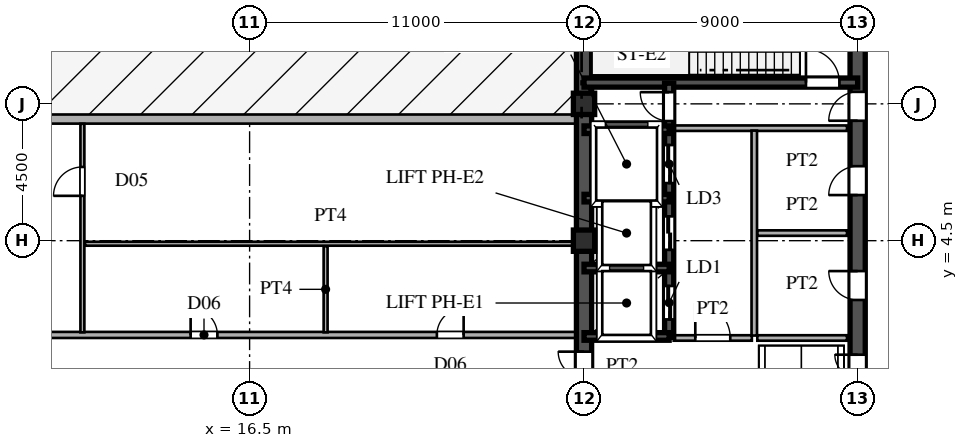
"""IFC4 building model, lengths in metres.
Left out: names, types, materials, properties, quantities, classifications, styles, units other than length and angle.
Written with IfcOpenShell. Run it as: python <this file> out.ifc"""

import sys

from ifc_helpers import new_model, si_unit, direction, frame, frame_2d, origin, origin_2d, place, context, subcontext, project, spatial, rectangle, hollow_rectangle, extrude, source, transform, mapped, element, fill, save


model = new_model("IFC4")
c1 = context("Model", 3, precision=1e-05, world=origin(), true_north=direction((0.0, 1.0)))
c2 = subcontext(c1, "Body", "Model", "MODEL_VIEW")
j1 = project(units=[si_unit("LENGTHUNIT", "METRE"), si_unit("PLANEANGLEUNIT", "RADIAN")], contexts=[c1])
p1 = place(None, origin())
s1 = spatial("IfcSite", under=j1, at=p1, CompositionType="ELEMENT")
p2 = place(p1, origin())
s2 = spatial("IfcBuilding", under=s1, at=p2, CompositionType="ELEMENT")
p3 = place(p2, frame((0.0, 0.0, 274.2)))
s3 = spatial("IfcBuildingStorey", under=s2, at=p3, CompositionType="ELEMENT", Elevation=274.2)
m1 = source(origin(), c2, "Body", "SweptSolid", [
    extrude(hollow_rectangle(XDim=0.7, YDim=0.7, WallThickness=0.03, at=origin_2d()), origin(), (0.0, 0.0, 1.0), 4.8),
])
for number, where, z_axis, x_axis in (
    (1, (27.5, 4.5, 0.0), (0.0, 0.0, 1.0), (1.0, 0.0, 0.0)),
    (2, (27.5, 9.0, 0.0), (0.0, 0.0, 1.0), (1.0, 0.0, 0.0)),
):
    element("IfcColumn", number, at=place(p3, frame(where, z_axis=z_axis, x_axis=x_axis)), inside=s3, PredefinedType="COLUMN", context=c2, shape_type="MappedRepresentation", body=[
        mapped(m1, transform((0.0, 0.0, 0.0), scale=1.0)),
    ])
p4 = place(p3, frame((-27.45, 8.5, 0.0), z_axis=(0.0, 0.0, 1.0), x_axis=(1.0, 0.0, 0.0)))
e3 = element("IfcWall", 3, at=p4, inside=s3, PredefinedType="SOLIDWALL", context=c2, shape_type="SweptSolid", body=[
    extrude(rectangle(XDim=54.9, YDim=0.3, at=frame_2d((27.45, 0.0))), origin(), (0.0, 0.0, 1.0), 4.52),
])
p5 = place(p4, frame((12.95, 0.0, 0.0)))
e4 = element("IfcOpeningElement", 4, at=p5, cuts=e3, PredefinedType="OPENING", context=c2, shape_type="SweptSolid", body=[
    extrude(rectangle(XDim=1.9, YDim=2.4, at=frame_2d((0.95, 1.2))), frame((0.0, 0.16, 0.0), z_axis=(0.0, -1.0, 0.0), x_axis=(1.0, 0.0, 0.0)), (0.0, 0.0, 1.0), 0.32),
])
p6 = place(p4, frame((23.95, 0.0, 0.0)))
e5 = element("IfcOpeningElement", 5, at=p6, cuts=e3, PredefinedType="OPENING", context=c2, shape_type="SweptSolid", body=[
    extrude(rectangle(XDim=1.9, YDim=2.4, at=frame_2d((0.95, 1.2))), frame((0.0, 0.16, 0.0), z_axis=(0.0, -1.0, 0.0), x_axis=(1.0, 0.0, 0.0)), (0.0, 0.0, 1.0), 0.32),
])
p7 = place(p4, frame((6.95, 0.0, 0.8)))
e6 = element("IfcOpeningElement", 6, at=p7, cuts=e3, PredefinedType="OPENING", context=c2, shape_type="SweptSolid", body=[
    extrude(rectangle(XDim=2.8, YDim=2.1, at=frame_2d((1.4, 1.05))), frame((0.0, 0.16, 0.0), z_axis=(0.0, -1.0, 0.0), x_axis=(1.0, 0.0, 0.0)), (0.0, 0.0, 1.0), 0.32),
])
p8 = place(p4, frame((17.95, 0.0, 0.8)))
e7 = element("IfcOpeningElement", 7, at=p8, cuts=e3, PredefinedType="OPENING", context=c2, shape_type="SweptSolid", body=[
    extrude(rectangle(XDim=2.8, YDim=2.1, at=frame_2d((1.4, 1.05))), frame((0.0, 0.16, 0.0), z_axis=(0.0, -1.0, 0.0), x_axis=(1.0, 0.0, 0.0)), (0.0, 0.0, 1.0), 0.32),
])
p9 = place(p4, frame((28.95, 0.0, 0.8)))
e8 = element("IfcOpeningElement", 8, at=p9, cuts=e3, PredefinedType="OPENING", context=c2, shape_type="SweptSolid", body=[
    extrude(rectangle(XDim=2.8, YDim=2.1, at=frame_2d((1.4, 1.05))), frame((0.0, 0.16, 0.0), z_axis=(0.0, -1.0, 0.0), x_axis=(1.0, 0.0, 0.0)), (0.0, 0.0, 1.0), 0.32),
])
p10 = place(p3, frame((27.5, 1.3, 0.0), z_axis=(0.0, 0.0, 1.0), x_axis=(0.0, 1.0, 0.0)))
e9 = element("IfcWall", 9, at=p10, inside=s3, PredefinedType="SHEAR", context=c2, shape_type="SweptSolid", body=[
    extrude(rectangle(XDim=12.2, YDim=0.5, at=frame_2d((6.1, 0.0))), origin(), (0.0, 0.0, 1.0), 4.52),
])
p11 = place(p3, frame((27.5, -1.3, 0.0), z_axis=(0.0, 0.0, 1.0), x_axis=(0.0, 1.0, 0.0)))
e10 = element("IfcWall", 10, at=p11, inside=s3, PredefinedType="SHEAR", context=c2, shape_type="SweptSolid", body=[
    extrude(rectangle(XDim=2.6, YDim=0.5, at=frame_2d((1.3, 0.0))), origin(), (0.0, 0.0, 1.0), 4.52),
])
p12 = place(p11, frame((0.45, 0.0, 0.0)))
e11 = element("IfcOpeningElement", 11, at=p12, cuts=e10, PredefinedType="OPENING", context=c2, shape_type="SweptSolid", body=[
    extrude(rectangle(XDim=1.7, YDim=2.35, at=frame_2d((0.85, 1.175))), frame((0.0, 0.26, 0.0), z_axis=(0.0, -1.0, 0.0), x_axis=(1.0, 0.0, 0.0)), (0.0, 0.0, 1.0), 0.52),
])
p13 = place(p3, frame((36.5, -1.3, 0.0), z_axis=(0.0, 0.0, 1.0), x_axis=(0.0, 1.0, 0.0)))
e12 = element("IfcWall", 12, at=p13, inside=s3, PredefinedType="SHEAR", context=c2, shape_type="SweptSolid", body=[
    extrude(rectangle(XDim=2.6, YDim=0.5, at=frame_2d((1.3, 0.0))), origin(), (0.0, 0.0, 1.0), 4.52),
])
p14 = place(p13, frame((0.55, 0.0, 0.0)))
e13 = element("IfcOpeningElement", 13, at=p14, cuts=e12, PredefinedType="OPENING", context=c2, shape_type="SweptSolid", body=[
    extrude(rectangle(XDim=1.5, YDim=2.3, at=frame_2d((0.75, 1.15))), frame((0.0, 0.26, 0.0), z_axis=(0.0, -1.0, 0.0), x_axis=(1.0, 0.0, 0.0)), (0.0, 0.0, 1.0), 0.52),
])
p15 = place(p3, frame((36.5, 8.2, 0.0), z_axis=(0.0, 0.0, 1.0), x_axis=(0.0, 1.0, 0.0)))
e14 = element("IfcWall", 14, at=p15, inside=s3, PredefinedType="SHEAR", context=c2, shape_type="SweptSolid", body=[
    extrude(rectangle(XDim=5.45, YDim=0.5, at=frame_2d((2.725, 0.0))), origin(), (0.0, 0.0, 1.0), 4.52),
])
p16 = place(p15, frame((0.245, 0.0, 0.0)))
e15 = element("IfcOpeningElement", 15, at=p16, cuts=e14, PredefinedType="OPENING", context=c2, shape_type="SweptSolid", body=[
    extrude(rectangle(XDim=0.95, YDim=2.15, at=frame_2d((0.475, 1.075))), frame((0.0, 0.26, 0.0), z_axis=(0.0, -1.0, 0.0), x_axis=(1.0, 0.0, 0.0)), (0.0, 0.0, 1.0), 0.52),
])
p17 = place(p3, frame((36.5, 1.3, 0.0), z_axis=(0.0, 0.0, 1.0), x_axis=(0.0, 1.0, 0.0)))
e16 = element("IfcWall", 16, at=p17, inside=s3, PredefinedType="SHEAR", context=c2, shape_type="SweptSolid", body=[
    extrude(rectangle(XDim=3.45, YDim=0.5, at=frame_2d((1.725, 0.0))), origin(), (0.0, 0.0, 1.0), 4.52),
])
p18 = place(p17, frame((1.25, 0.0, 0.0)))
e17 = element("IfcOpeningElement", 17, at=p18, cuts=e16, PredefinedType="OPENING", context=c2, shape_type="SweptSolid", body=[
    extrude(rectangle(XDim=0.95, YDim=2.15, at=frame_2d((0.475, 1.075))), frame((0.0, 0.26, 0.0), z_axis=(0.0, -1.0, 0.0), x_axis=(1.0, 0.0, 0.0)), (0.0, 0.0, 1.0), 0.52),
])
p19 = place(p3, frame((36.5, 4.75, 0.0), z_axis=(0.0, 0.0, 1.0), x_axis=(0.0, 1.0, 0.0)))
e18 = element("IfcWall", 18, at=p19, inside=s3, PredefinedType="SHEAR", context=c2, shape_type="SweptSolid", body=[
    extrude(rectangle(XDim=3.45, YDim=0.5, at=frame_2d((1.725, 0.0))), origin(), (0.0, 0.0, 1.0), 4.52),
])
p20 = place(p19, frame((1.25, 0.0, 0.0)))
e19 = element("IfcOpeningElement", 19, at=p20, cuts=e18, PredefinedType="OPENING", context=c2, shape_type="SweptSolid", body=[
    extrude(rectangle(XDim=0.95, YDim=2.15, at=frame_2d((0.475, 1.075))), frame((0.0, 0.26, 0.0), z_axis=(0.0, -1.0, 0.0), x_axis=(1.0, 0.0, 0.0)), (0.0, 0.0, 1.0), 0.52),
])
p21 = place(p3, frame((27.5, 9.7, 0.0), z_axis=(0.0, 0.0, 1.0), x_axis=(1.0, 0.0, 0.0)))
e20 = element("IfcWall", 20, at=p21, inside=s3, PredefinedType="SHEAR", context=c2, shape_type="SweptSolid", body=[
    extrude(rectangle(XDim=9.0, YDim=0.3, at=frame_2d((4.5, 0.0))), origin(), (0.0, 0.0, 1.0), 4.52),
])
p22 = place(p21, frame((7.3, 0.0, 0.0)))
e21 = element("IfcOpeningElement", 21, at=p22, cuts=e20, PredefinedType="OPENING", context=c2, shape_type="SweptSolid", body=[
    extrude(rectangle(XDim=1.1, YDim=2.2, at=frame_2d((0.55, 1.1))), frame((0.0, 0.16, 0.0), z_axis=(0.0, -1.0, 0.0), x_axis=(1.0, 0.0, 0.0)), (0.0, 0.0, 1.0), 0.32),
])
for number, where, z_axis, x_axis in (
    (22, (27.5, 1.35, 0.0), (0.0, 0.0, 1.0), (1.0, 0.0, 0.0)),
    (23, (27.5, 3.6, 0.0), (0.0, 0.0, 1.0), (1.0, 0.0, 0.0)),
    (24, (27.5, 5.9, 0.0), (0.0, 0.0, 1.0), (1.0, 0.0, 0.0)),
    (25, (27.5, 8.15, 0.0), (0.0, 0.0, 1.0), (1.0, 0.0, 0.0)),
):
    element("IfcWall", number, at=place(p3, frame(where, z_axis=z_axis, x_axis=x_axis)), inside=s3, PredefinedType="SHEAR", context=c2, shape_type="SweptSolid", body=[
        extrude(rectangle(XDim=2.8, YDim=0.25, at=frame_2d((1.4, 0.0))), origin(), (0.0, 0.0, 1.0), 4.52),
    ])
p23 = place(p3, frame((30.3, 1.32, 0.0), z_axis=(0.0, 0.0, 1.0), x_axis=(0.0, 1.0, 0.0)))
e26 = element("IfcWall", 26, at=p23, inside=s3, PredefinedType="SHEAR", context=c2, shape_type="SweptSolid", body=[
    extrude(rectangle(XDim=2.28, YDim=0.3, at=frame_2d((1.14, 0.0))), origin(), (0.0, 0.0, 1.0), 4.52),
])
p24 = place(p23, frame((0.59, 0.0, 0.0)))
e27 = element("IfcOpeningElement", 27, at=p24, cuts=e26, PredefinedType="OPENING", context=c2, shape_type="SweptSolid", body=[
    extrude(rectangle(XDim=1.1, YDim=2.2, at=frame_2d((0.55, 1.1))), frame((0.0, 0.16, 0.0), z_axis=(0.0, -1.0, 0.0), x_axis=(1.0, 0.0, 0.0)), (0.0, 0.0, 1.0), 0.32),
])
p25 = place(p3, frame((30.3, 3.6, 0.0), z_axis=(0.0, 0.0, 1.0), x_axis=(0.0, 1.0, 0.0)))
e28 = element("IfcWall", 28, at=p25, inside=s3, PredefinedType="SHEAR", context=c2, shape_type="SweptSolid", body=[
    extrude(rectangle(XDim=2.3, YDim=0.3, at=frame_2d((1.15, 0.0))), origin(), (0.0, 0.0, 1.0), 4.52),
])
p26 = place(p25, frame((0.6, 0.0, 0.0)))
e29 = element("IfcOpeningElement", 29, at=p26, cuts=e28, PredefinedType="OPENING", context=c2, shape_type="SweptSolid", body=[
    extrude(rectangle(XDim=1.1, YDim=2.2, at=frame_2d((0.55, 1.1))), frame((0.0, 0.16, 0.0), z_axis=(0.0, -1.0, 0.0), x_axis=(1.0, 0.0, 0.0)), (0.0, 0.0, 1.0), 0.32),
])
p27 = place(p3, frame((30.3, 5.9, 0.0), z_axis=(0.0, 0.0, 1.0), x_axis=(0.0, 1.0, 0.0)))
e30 = element("IfcWall", 30, at=p27, inside=s3, PredefinedType="SHEAR", context=c2, shape_type="SweptSolid", body=[
    extrude(rectangle(XDim=2.25, YDim=0.3, at=frame_2d((1.125, 0.0))), origin(), (0.0, 0.0, 1.0), 4.52),
])
p28 = place(p27, frame((0.495, 0.0, 0.0)))
e31 = element("IfcOpeningElement", 31, at=p28, cuts=e30, PredefinedType="OPENING", context=c2, shape_type="SweptSolid", body=[
    extrude(rectangle(XDim=1.25, YDim=2.3, at=frame_2d((0.625, 1.15))), frame((0.0, 0.16, 0.0), z_axis=(0.0, -1.0, 0.0), x_axis=(1.0, 0.0, 0.0)), (0.0, 0.0, 1.0), 0.32),
])
p29 = place(p3, frame((30.3, 8.15, 0.0), z_axis=(0.0, 0.0, 1.0), x_axis=(0.0, 1.0, 0.0)))
e32 = element("IfcWall", 32, at=p29, inside=s3, PredefinedType="SHEAR", context=c2, shape_type="SweptSolid", body=[
    extrude(rectangle(XDim=1.53, YDim=0.3, at=frame_2d((0.765, 0.0))), origin(), (0.0, 0.0, 1.0), 4.52),
])
p30 = place(p29, frame((0.285, 0.0, 0.0)))
e33 = element("IfcOpeningElement", 33, at=p30, cuts=e32, PredefinedType="OPENING", context=c2, shape_type="SweptSolid", body=[
    extrude(rectangle(XDim=0.95, YDim=2.15, at=frame_2d((0.475, 1.075))), frame((0.0, 0.16, 0.0), z_axis=(0.0, -1.0, 0.0), x_axis=(1.0, 0.0, 0.0)), (0.0, 0.0, 1.0), 0.32),
])
p31 = place(p3, frame((30.45, 8.2, 0.0), z_axis=(0.0, 0.0, 1.0), x_axis=(1.0, 0.0, 0.0)))
e34 = element("IfcWall", 34, at=p31, inside=s3, PredefinedType="PARTITIONING", context=c2, shape_type="SweptSolid", body=[
    extrude(rectangle(XDim=5.7, YDim=0.18, at=frame_2d((2.85, 0.0))), origin(), (0.0, 0.0, 1.0), 4.52),
])
p32 = place(p3, frame((33.1, 1.38, 0.0), z_axis=(0.0, 0.0, 1.0), x_axis=(0.0, 1.0, 0.0)))
e35 = element("IfcWall", 35, at=p32, inside=s3, PredefinedType="PARTITIONING", context=c2, shape_type="SweptSolid", body=[
    extrude(rectangle(XDim=6.74, YDim=0.18, at=frame_2d((3.37, 0.0))), origin(), (0.0, 0.0, 1.0), 4.52),
])
p33 = place(p3, frame((30.45, 1.3, 0.0), z_axis=(0.0, 0.0, 1.0), x_axis=(1.0, 0.0, 0.0)))
e36 = element("IfcWall", 36, at=p33, inside=s3, PredefinedType="PARTITIONING", context=c2, shape_type="SweptSolid", body=[
    extrude(rectangle(XDim=2.57, YDim=0.18, at=frame_2d((1.285, 0.0))), origin(), (0.0, 0.0, 1.0), 4.52),
])
p34 = place(p33, frame((0.71, 0.0, 0.0)))
e37 = element("IfcOpeningElement", 37, at=p34, cuts=e36, PredefinedType="OPENING", context=c2, shape_type="SweptSolid", body=[
    extrude(rectangle(XDim=1.15, YDim=2.2, at=frame_2d((0.575, 1.1))), frame((0.0, 0.1, 0.0), z_axis=(0.0, -1.0, 0.0), x_axis=(1.0, 0.0, 0.0)), (0.0, 0.0, 1.0), 0.2),
])
for number, where, z_axis, x_axis in (
    (38, (33.2, 1.3, 0.0), (0.0, 0.0, 1.0), (1.0, 0.0, 0.0)),
    (39, (33.2, 4.75, 0.0), (0.0, 0.0, 1.0), (1.0, 0.0, 0.0)),
):
    element("IfcWall", number, at=place(p3, frame(where, z_axis=z_axis, x_axis=x_axis)), inside=s3, PredefinedType="PARTITIONING", context=c2, shape_type="SweptSolid", body=[
        extrude(rectangle(XDim=2.95, YDim=0.18, at=frame_2d((1.475, 0.0))), origin(), (0.0, 0.0, 1.0), 4.52),
    ])
p35 = place(p3, frame((-27.245, 1.4, 0.0), z_axis=(0.0, 0.0, 1.0), x_axis=(1.0, 0.0, 0.0)))
e40 = element("IfcWall", 40, at=p35, inside=s3, PredefinedType="PARTITIONING", context=c2, shape_type="SweptSolid", body=[
    extrude(rectangle(XDim=54.49, YDim=0.2, at=frame_2d((27.245, 0.0))), origin(), (0.0, 0.0, 1.0), 4.52),
])
p36 = place(p35, frame((17.67, 0.0, 0.0)))
e41 = element("IfcOpeningElement", 41, at=p36, cuts=e40, PredefinedType="OPENING", context=c2, shape_type="SweptSolid", body=[
    extrude(rectangle(XDim=1.15, YDim=2.2, at=frame_2d((0.575, 1.1))), frame((0.0, 0.11, 0.0), z_axis=(0.0, -1.0, 0.0), x_axis=(1.0, 0.0, 0.0)), (0.0, 0.0, 1.0), 0.22),
])
p37 = place(p35, frame((41.805, 0.0, 0.0)))
e42 = element("IfcOpeningElement", 42, at=p37, cuts=e40, PredefinedType="OPENING", context=c2, shape_type="SweptSolid", body=[
    extrude(rectangle(XDim=0.88, YDim=2.1, at=frame_2d((0.44, 1.05))), frame((0.0, 0.11, 0.0), z_axis=(0.0, -1.0, 0.0), x_axis=(1.0, 0.0, 0.0)), (0.0, 0.0, 1.0), 0.22),
])
p38 = place(p35, frame((49.905, 0.0, 0.0)))
e43 = element("IfcOpeningElement", 43, at=p38, cuts=e40, PredefinedType="OPENING", context=c2, shape_type="SweptSolid", body=[
    extrude(rectangle(XDim=0.88, YDim=2.1, at=frame_2d((0.44, 1.05))), frame((0.0, 0.11, 0.0), z_axis=(0.0, -1.0, 0.0), x_axis=(1.0, 0.0, 0.0)), (0.0, 0.0, 1.0), 0.22),
])
p39 = place(p3, frame((11.085, 4.4, 0.0), z_axis=(0.0, 0.0, 1.0), x_axis=(1.0, 0.0, 0.0)))
e44 = element("IfcWall", 44, at=p39, inside=s3, PredefinedType="PARTITIONING", context=c2, shape_type="SweptSolid", body=[
    extrude(rectangle(XDim=16.16, YDim=0.13, at=frame_2d((8.08, 0.0))), origin(), (0.0, 0.0, 1.0), 4.52),
])
p40 = place(p3, frame((11.0, 1.485, 0.0), z_axis=(0.0, 0.0, 1.0), x_axis=(0.0, 1.0, 0.0)))
e45 = element("IfcWall", 45, at=p40, inside=s3, PredefinedType="PARTITIONING", context=c2, shape_type="SweptSolid", body=[
    extrude(rectangle(XDim=6.86, YDim=0.13, at=frame_2d((3.43, 0.0))), origin(), (0.0, 0.0, 1.0), 3.22),
])
p41 = place(p40, frame((4.49, 0.0, 0.0)))
e46 = element("IfcOpeningElement", 46, at=p41, cuts=e45, PredefinedType="OPENING", context=c2, shape_type="SweptSolid", body=[
    extrude(rectangle(XDim=0.95, YDim=2.15, at=frame_2d((0.475, 1.075))), frame((0.0, 0.075, 0.0), z_axis=(0.0, -1.0, 0.0), x_axis=(1.0, 0.0, 0.0)), (0.0, 0.0, 1.0), 0.15),
])
p42 = place(p3, frame((19.0, 1.485, 0.0), z_axis=(0.0, 0.0, 1.0), x_axis=(0.0, 1.0, 0.0)))
e47 = element("IfcWall", 47, at=p42, inside=s3, PredefinedType="PARTITIONING", context=c2, shape_type="SweptSolid", body=[
    extrude(rectangle(XDim=2.83, YDim=0.13, at=frame_2d((1.415, 0.0))), origin(), (0.0, 0.0, 1.0), 4.52),
])
m2 = source(origin(), c2, "Body", "SweptSolid", [
    extrude(rectangle(XDim=1.7, YDim=2.35, at=frame_2d((0.85, 1.175))), frame((0.0, 0.025, 0.0), z_axis=(0.0, -1.0, 0.0), x_axis=(1.0, 0.0, 0.0)), (0.0, 0.0, 1.0), 0.05),
])
p43 = place(p12, origin())
e48 = element("IfcDoor", 48, at=p43, inside=s3, OperationType="DOUBLE_SWING_LEFT", PredefinedType="DOOR", context=c2, shape_type="MappedRepresentation", body=[
    mapped(m2, transform((0.0, 0.0, 0.0), scale=1.0)),
])
fill(e11, e48)
m3 = source(origin(), c2, "Body", "SweptSolid", [
    extrude(rectangle(XDim=1.5, YDim=2.3, at=frame_2d((0.75, 1.15))), frame((0.0, 0.025, 0.0), z_axis=(0.0, -1.0, 0.0), x_axis=(1.0, 0.0, 0.0)), (0.0, 0.0, 1.0), 0.05),
])
p44 = place(p14, origin())
e49 = element("IfcDoor", 49, at=p44, inside=s3, OperationType="DOUBLE_SWING_LEFT", PredefinedType="DOOR", context=c2, shape_type="MappedRepresentation", body=[
    mapped(m3, transform((0.0, 0.0, 0.0), scale=1.0)),
])
fill(e13, e49)
m4 = source(origin(), c2, "Body", "SweptSolid", [
    extrude(rectangle(XDim=0.95, YDim=2.15, at=frame_2d((0.475, 1.075))), frame((0.0, 0.025, 0.0), z_axis=(0.0, -1.0, 0.0), x_axis=(1.0, 0.0, 0.0)), (0.0, 0.0, 1.0), 0.05),
])
p45 = place(p16, origin())
e50 = element("IfcDoor", 50, at=p45, inside=s3, OperationType="SINGLE_SWING_LEFT", PredefinedType="DOOR", context=c2, shape_type="MappedRepresentation", body=[
    mapped(m4, transform((0.0, 0.0, 0.0), scale=1.0)),
])
fill(e15, e50)
p46 = place(p18, origin())
e51 = element("IfcDoor", 51, at=p46, inside=s3, OperationType="SINGLE_SWING_RIGHT", PredefinedType="DOOR", context=c2, shape_type="MappedRepresentation", body=[
    mapped(m4, transform((0.0, 0.0, 0.0), scale=1.0)),
])
fill(e17, e51)
p47 = place(p20, origin())
e52 = element("IfcDoor", 52, at=p47, inside=s3, OperationType="SINGLE_SWING_LEFT", PredefinedType="DOOR", context=c2, shape_type="MappedRepresentation", body=[
    mapped(m4, transform((0.0, 0.0, 0.0), scale=1.0)),
])
fill(e19, e52)
m5 = source(origin(), c2, "Body", "SweptSolid", [
    extrude(rectangle(XDim=1.1, YDim=2.2, at=frame_2d((0.55, 1.1))), frame((0.0, 0.025, 0.0), z_axis=(0.0, -1.0, 0.0), x_axis=(1.0, 0.0, 0.0)), (0.0, 0.0, 1.0), 0.05),
])
p48 = place(p22, origin())
e53 = element("IfcDoor", 53, at=p48, inside=s3, OperationType="SINGLE_SWING_LEFT", PredefinedType="DOOR", context=c2, shape_type="MappedRepresentation", body=[
    mapped(m5, transform((0.0, 0.0, 0.0), scale=1.0)),
])
fill(e21, e53)
m6 = source(origin(), c2, "Body", "SweptSolid", [
    extrude(rectangle(XDim=1.1, YDim=2.2, at=frame_2d((0.55, 1.1))), frame((0.0, 0.025, 0.0), z_axis=(0.0, -1.0, 0.0), x_axis=(1.0, 0.0, 0.0)), (0.0, 0.0, 1.0), 0.05),
])
p49 = place(p24, origin())
e54 = element("IfcDoor", 54, at=p49, inside=s3, OperationType="DOUBLE_DOOR_SLIDING", PredefinedType="DOOR", context=c2, shape_type="MappedRepresentation", body=[
    mapped(m6, transform((0.0, 0.0, 0.0), scale=1.0)),
])
fill(e27, e54)
p50 = place(p26, origin())
e55 = element("IfcDoor", 55, at=p50, inside=s3, OperationType="DOUBLE_DOOR_SLIDING", PredefinedType="DOOR", context=c2, shape_type="MappedRepresentation", body=[
    mapped(m6, transform((0.0, 0.0, 0.0), scale=1.0)),
])
fill(e29, e55)
m7 = source(origin(), c2, "Body", "SweptSolid", [
    extrude(rectangle(XDim=1.25, YDim=2.3, at=frame_2d((0.625, 1.15))), frame((0.0, 0.025, 0.0), z_axis=(0.0, -1.0, 0.0), x_axis=(1.0, 0.0, 0.0)), (0.0, 0.0, 1.0), 0.05),
])
p51 = place(p28, origin())
e56 = element("IfcDoor", 56, at=p51, inside=s3, OperationType="DOUBLE_DOOR_SLIDING", PredefinedType="DOOR", context=c2, shape_type="MappedRepresentation", body=[
    mapped(m7, transform((0.0, 0.0, 0.0), scale=1.0)),
])
fill(e31, e56)
p52 = place(p30, origin())
e57 = element("IfcDoor", 57, at=p52, inside=s3, OperationType="SINGLE_SWING_RIGHT", PredefinedType="DOOR", context=c2, shape_type="MappedRepresentation", body=[
    mapped(m4, transform((0.0, 0.0, 0.0), scale=1.0)),
])
fill(e33, e57)
m8 = source(origin(), c2, "Body", "SweptSolid", [
    extrude(rectangle(XDim=1.15, YDim=2.2, at=frame_2d((0.575, 1.1))), frame((0.0, 0.025, 0.0), z_axis=(0.0, -1.0, 0.0), x_axis=(1.0, 0.0, 0.0)), (0.0, 0.0, 1.0), 0.05),
])
p53 = place(p34, origin())
e58 = element("IfcDoor", 58, at=p53, inside=s3, OperationType="SINGLE_SWING_LEFT", PredefinedType="DOOR", context=c2, shape_type="MappedRepresentation", body=[
    mapped(m8, transform((0.0, 0.0, 0.0), scale=1.0)),
])
fill(e37, e58)
m9 = source(origin(), c2, "Body", "SweptSolid", [
    extrude(rectangle(XDim=0.88, YDim=2.1, at=frame_2d((0.44, 1.05))), frame((0.0, 0.025, 0.0), z_axis=(0.0, -1.0, 0.0), x_axis=(1.0, 0.0, 0.0)), (0.0, 0.0, 1.0), 0.05),
])
p54 = place(p37, origin())
e59 = element("IfcDoor", 59, at=p54, inside=s3, OperationType="SINGLE_SWING_LEFT", PredefinedType="DOOR", context=c2, shape_type="MappedRepresentation", body=[
    mapped(m9, transform((0.0, 0.0, 0.0), scale=1.0)),
])
fill(e42, e59)
p55 = place(p38, origin())
e60 = element("IfcDoor", 60, at=p55, inside=s3, OperationType="SINGLE_SWING_RIGHT", PredefinedType="DOOR", context=c2, shape_type="MappedRepresentation", body=[
    mapped(m9, transform((0.0, 0.0, 0.0), scale=1.0)),
])
fill(e43, e60)
m10 = source(origin(), c2, "Body", "SweptSolid", [
    extrude(rectangle(XDim=0.95, YDim=2.15, at=frame_2d((0.475, 1.075))), frame((0.0, 0.025, 0.0), z_axis=(0.0, -1.0, 0.0), x_axis=(1.0, 0.0, 0.0)), (0.0, 0.0, 1.0), 0.05),
])
p56 = place(p41, origin())
e61 = element("IfcDoor", 61, at=p56, inside=s3, OperationType="SINGLE_SWING_LEFT", PredefinedType="DOOR", context=c2, shape_type="MappedRepresentation", body=[
    mapped(m10, transform((0.0, 0.0, 0.0), scale=1.0)),
])
fill(e46, e61)
save(model, sys.argv[1])
